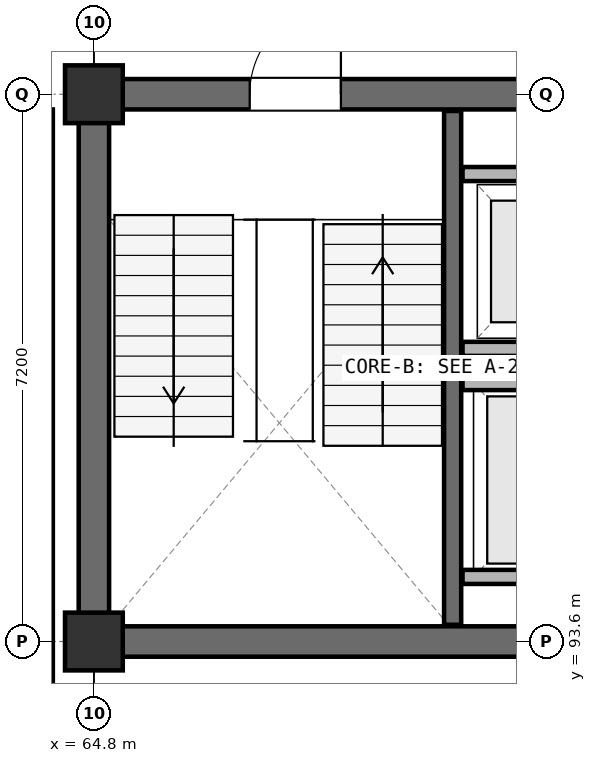
"""IFC4 building model, lengths in metres.
Left out: names, types, materials, properties, quantities, classifications, styles, units other than length and angle.
Written with IfcOpenShell. Run it as: python <this file> out.ifc"""

import sys

from ifc_helpers import new_model, si_unit, direction, frame, frame_2d, origin, origin_2d, place, context, subcontext, project, spatial, rectangle, extrude, element, fill, save


model = new_model("IFC4")
c1 = context("Model", 3, precision=1e-05, world=origin(), true_north=direction((0.0, 1.0)))
c2 = subcontext(c1, "Body", "Model", "MODEL_VIEW")
j1 = project(units=[si_unit("LENGTHUNIT", "METRE"), si_unit("PLANEANGLEUNIT", "RADIAN")], contexts=[c1])
p1 = place(None, origin())
s1 = spatial("IfcSite", under=j1, at=p1, CompositionType="ELEMENT")
p2 = place(p1, origin())
s2 = spatial("IfcBuilding", under=s1, at=p2, CompositionType="ELEMENT")
p3 = place(p2, frame((0.0, 0.0, 18.6)))
s3 = spatial("IfcBuildingStorey", under=s2, at=p3, CompositionType="ELEMENT", Elevation=18.6)
for number, where, z_axis, x_axis in (
    (1, (64.8, 93.6, 0.0), (0.0, 0.0, 1.0), (1.0, 0.0, 0.0)),
    (2, (64.8, 100.8, 0.0), (0.0, 0.0, 1.0), (1.0, 0.0, 0.0)),
):
    element("IfcColumn", number, at=place(p3, frame(where, z_axis=z_axis, x_axis=x_axis)), inside=s3, PredefinedType="COLUMN", context=c2, shape_type="SweptSolid", body=[
        extrude(rectangle(XDim=0.76, YDim=0.76, at=origin_2d()), origin(), (0.0, 0.0, 1.0), 3.9),
    ])
p4 = place(p3, frame((65.15, 93.6, 0.0), z_axis=(0.0, 0.0, 1.0), x_axis=(1.0, 0.0, 0.0)))
e3 = element("IfcWall", 3, at=p4, inside=s3, PredefinedType="SHEAR", context=c2, shape_type="SweptSolid", body=[
    extrude(rectangle(XDim=6.5, YDim=0.4, at=frame_2d((3.25, 0.0))), origin(), (0.0, 0.0, 1.0), 3.9),
])
p5 = place(p3, frame((71.65, 100.8, 0.0), z_axis=(0.0, 0.0, 1.0), x_axis=(-1.0, 0.0, 0.0)))
e4 = element("IfcWall", 4, at=p5, inside=s3, PredefinedType="SHEAR", context=c2, shape_type="SweptSolid", body=[
    extrude(rectangle(XDim=6.5, YDim=0.4, at=frame_2d((3.25, 0.0))), origin(), (0.0, 0.0, 1.0), 3.9),
])
p6 = place(p5, frame((3.6, 0.0, 0.0)))
e5 = element("IfcOpeningElement", 5, at=p6, cuts=e4, PredefinedType="OPENING", context=c2, shape_type="SweptSolid", body=[
    extrude(rectangle(XDim=1.2, YDim=2.2, at=frame_2d((0.6, 1.1))), frame((0.0, 0.21, 0.0), z_axis=(0.0, -1.0, 0.0), x_axis=(1.0, 0.0, 0.0)), (0.0, 0.0, 1.0), 0.42),
])
p7 = place(p3, frame((64.8, 100.45, 0.0), z_axis=(0.0, 0.0, 1.0), x_axis=(0.0, -1.0, 0.0)))
e6 = element("IfcWall", 6, at=p7, inside=s3, PredefinedType="SHEAR", context=c2, shape_type="SweptSolid", body=[
    extrude(rectangle(XDim=6.5, YDim=0.4, at=frame_2d((3.25, 0.0))), origin(), (0.0, 0.0, 1.0), 3.9),
])
p8 = place(p3, frame((69.52, 93.82, 0.0), z_axis=(0.0, 0.0, 1.0), x_axis=(0.0, 1.0, 0.0)))
e7 = element("IfcWall", 7, at=p8, inside=s3, PredefinedType="SHEAR", context=c2, shape_type="SweptSolid", body=[
    extrude(rectangle(XDim=6.76, YDim=0.225, at=frame_2d((3.38, 0.0))), origin(), (0.0, 0.0, 1.0), 3.9),
])
for number, where, z_axis, x_axis in (
    (8, (69.65, 94.45, 0.0), (0.0, 0.0, 1.0), (1.0, 0.0, 0.0)),
    (9, (69.65, 97.0, 0.0), (0.0, 0.0, 1.0), (1.0, 0.0, 0.0)),
    (10, (69.65, 97.45, 0.0), (0.0, 0.0, 1.0), (1.0, 0.0, 0.0)),
    (11, (69.65, 99.75, 0.0), (0.0, 0.0, 1.0), (1.0, 0.0, 0.0)),
):
    element("IfcWall", number, at=place(p3, frame(where, z_axis=z_axis, x_axis=x_axis)), inside=s3, PredefinedType="PARTITIONING", context=c2, shape_type="SweptSolid", body=[
        extrude(rectangle(XDim=2.1, YDim=0.185, at=frame_2d((1.05, 0.0))), origin(), (0.0, 0.0, 1.0), 3.9),
    ])
p9 = place(p3, frame((64.2, 100.6, 0.0), z_axis=(0.0, 0.0, 1.0), x_axis=(0.0, -1.0, 0.0)))
e12 = element("IfcWall", 12, at=p9, inside=s3, PredefinedType="PARTITIONING", context=c2, shape_type="SweptSolid", body=[
    extrude(rectangle(XDim=13.4, YDim=0.12, at=frame_2d((6.7, 0.0))), origin(), (0.0, 0.0, 1.0), 2.78),
])
p10 = place(p6, frame((1.2, 0.0, 0.0), z_axis=(0.0, 0.0, 1.0), x_axis=(-1.0, 0.0, 0.0)))
e13 = element("IfcDoor", 13, at=p10, inside=s3, OperationType="SINGLE_SWING_RIGHT", PredefinedType="DOOR", context=c2, shape_type="SweptSolid", body=[
    extrude(rectangle(XDim=1.2, YDim=2.2, at=frame_2d((0.6, 1.1))), frame((0.0, 0.025, 0.0), z_axis=(0.0, -1.0, 0.0), x_axis=(1.0, 0.0, 0.0)), (0.0, 0.0, 1.0), 0.05),
])
fill(e5, e13)
save(model, sys.argv[1])
